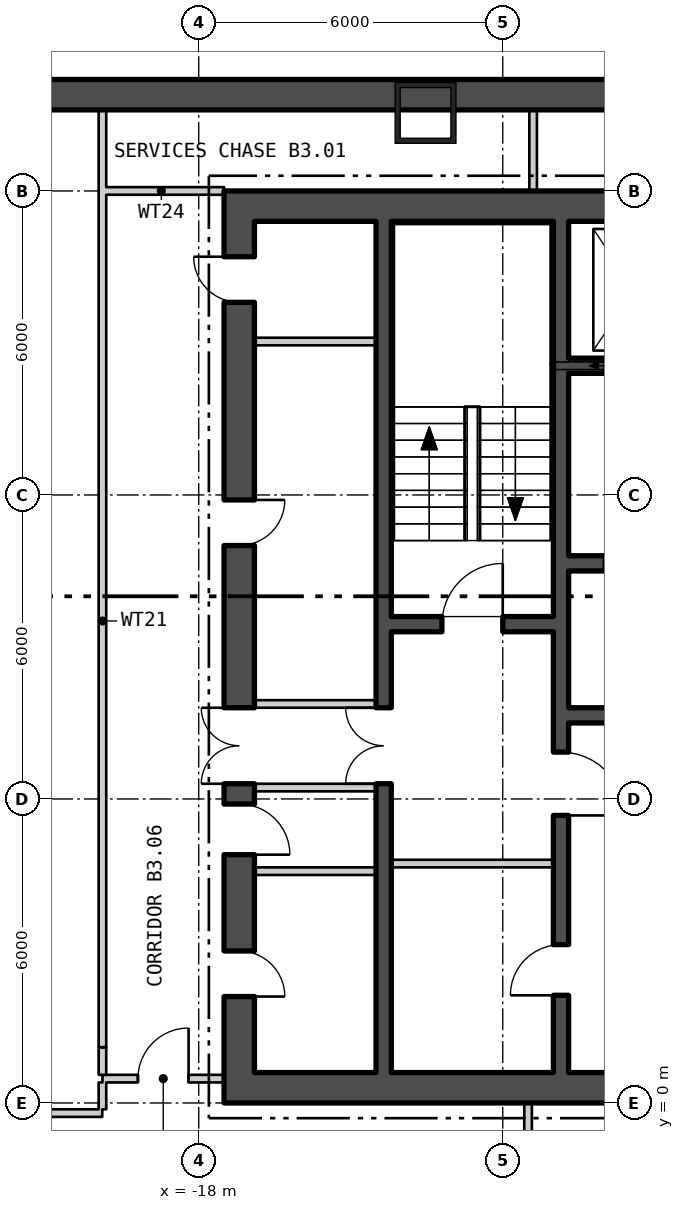
"""IFC4 building model, lengths in metres.
Left out: names, types, materials, properties, quantities, classifications, styles, units other than length and angle.
Written with IfcOpenShell. Run it as: python <this file> out.ifc"""

import sys

from ifc_helpers import new_model, si_unit, direction, frame, frame_2d, origin, origin_2d, place, context, subcontext, project, spatial, rectangle, hollow_rectangle, extrude, element, fill, save


model = new_model("IFC4")
c1 = context("Model", 3, precision=1e-05, world=origin(), true_north=direction((0.0, 1.0)))
c2 = subcontext(c1, "Body", "Model", "MODEL_VIEW")
j1 = project(units=[si_unit("LENGTHUNIT", "METRE"), si_unit("PLANEANGLEUNIT", "RADIAN")], contexts=[c1])
p1 = place(None, origin())
s1 = spatial("IfcSite", under=j1, at=p1, CompositionType="ELEMENT")
p2 = place(p1, origin())
s2 = spatial("IfcBuilding", under=s1, at=p2, CompositionType="ELEMENT")
p3 = place(p2, frame((0.0, 0.0, -16.8)))
s3 = spatial("IfcBuildingStorey", under=s2, at=p3, CompositionType="ELEMENT", Elevation=-16.8)
p4 = place(p3, frame((-13.523, 19.54, 0.0), z_axis=(0.0, 0.0, 1.0), x_axis=(-1.0, 0.0, 0.0)))
e1 = element("IfcColumn", 1, at=p4, inside=s3, PredefinedType="COLUMN", context=c2, shape_type="SweptSolid", body=[
    extrude(hollow_rectangle(XDim=1.2, YDim=1.2, WallThickness=0.1, at=origin_2d()), origin(), (0.0, 0.0, 1.0), 5.4),
])
p5 = place(p3, frame((-39.0, 19.9, -0.4), z_axis=(0.0, 0.0, 1.0), x_axis=(1.0, 0.0, 0.0)))
e2 = element("IfcWall", 2, at=p5, inside=s3, PredefinedType="STANDARD", context=c2, shape_type="SweptSolid", body=[
    extrude(rectangle(XDim=78.0, YDim=0.6, at=frame_2d((39.0, 0.0))), origin(), (0.0, 0.0, 1.0), 5.4),
])
p6 = place(p3, frame((-17.5, 0.3, 0.0), z_axis=(0.0, 0.0, 1.0), x_axis=(1.0, 0.0, 0.0)))
e3 = element("IfcWall", 3, at=p6, inside=s3, PredefinedType="SHEAR", context=c2, shape_type="SweptSolid", body=[
    extrude(rectangle(XDim=35.0, YDim=0.6, at=frame_2d((17.5, 0.0))), origin(), (0.0, 0.0, 1.0), 4.95),
])
p7 = place(p6, frame((12.0, 0.0, 0.0)))
e4 = element("IfcOpeningElement", 4, at=p7, cuts=e3, PredefinedType="OPENING", context=c2, shape_type="SweptSolid", body=[
    extrude(rectangle(XDim=1.8, YDim=2.4, at=frame_2d((0.9, 1.2))), frame((0.0, 0.31, 0.0), z_axis=(0.0, -1.0, 0.0), x_axis=(1.0, 0.0, 0.0)), (0.0, 0.0, 1.0), 0.62),
])
p8 = place(p6, frame((22.0, 0.0, 0.0)))
e5 = element("IfcOpeningElement", 5, at=p8, cuts=e3, PredefinedType="OPENING", context=c2, shape_type="SweptSolid", body=[
    extrude(rectangle(XDim=1.8, YDim=2.4, at=frame_2d((0.9, 1.2))), frame((0.0, 0.31, 0.0), z_axis=(0.0, -1.0, 0.0), x_axis=(1.0, 0.0, 0.0)), (0.0, 0.0, 1.0), 0.62),
])
p9 = place(p3, frame((-17.5, 17.7, 0.0), z_axis=(0.0, 0.0, 1.0), x_axis=(1.0, 0.0, 0.0)))
e6 = element("IfcWall", 6, at=p9, inside=s3, PredefinedType="SHEAR", context=c2, shape_type="SweptSolid", body=[
    extrude(rectangle(XDim=35.0, YDim=0.6, at=frame_2d((17.5, 0.0))), origin(), (0.0, 0.0, 1.0), 4.95),
])
p10 = place(p3, frame((-17.2, 0.6, 0.0), z_axis=(0.0, 0.0, 1.0), x_axis=(0.0, 1.0, 0.0)))
e7 = element("IfcWall", 7, at=p10, inside=s3, PredefinedType="SHEAR", context=c2, shape_type="SweptSolid", body=[
    extrude(rectangle(XDim=16.8, YDim=0.6, at=frame_2d((8.4, 0.0))), origin(), (0.0, 0.0, 1.0), 4.95),
])
p11 = place(p10, frame((5.7, 0.0, 0.0)))
e8 = element("IfcOpeningElement", 8, at=p11, cuts=e7, PredefinedType="OPENING", context=c2, shape_type="SweptSolid", body=[
    extrude(rectangle(XDim=1.5, YDim=2.1, at=frame_2d((0.75, 1.05))), frame((0.0, 0.31, 0.0), z_axis=(0.0, -1.0, 0.0), x_axis=(1.0, 0.0, 0.0)), (0.0, 0.0, 1.0), 0.62),
])
p12 = place(p10, frame((1.5, 0.0, 0.0)))
e9 = element("IfcOpeningElement", 9, at=p12, cuts=e7, PredefinedType="OPENING", context=c2, shape_type="SweptSolid", body=[
    extrude(rectangle(XDim=0.9, YDim=2.1, at=frame_2d((0.45, 1.05))), frame((0.0, 0.31, 0.0), z_axis=(0.0, -1.0, 0.0), x_axis=(1.0, 0.0, 0.0)), (0.0, 0.0, 1.0), 0.62),
])
p13 = place(p10, frame((4.3, 0.0, 0.0)))
e10 = element("IfcOpeningElement", 10, at=p13, cuts=e7, PredefinedType="OPENING", context=c2, shape_type="SweptSolid", body=[
    extrude(rectangle(XDim=1.0, YDim=2.1, at=frame_2d((0.5, 1.05))), frame((0.0, 0.31, 0.0), z_axis=(0.0, -1.0, 0.0), x_axis=(1.0, 0.0, 0.0)), (0.0, 0.0, 1.0), 0.62),
])
p14 = place(p10, frame((10.402, 0.0, 0.0)))
e11 = element("IfcOpeningElement", 11, at=p14, cuts=e7, PredefinedType="OPENING", context=c2, shape_type="SweptSolid", body=[
    extrude(rectangle(XDim=0.9, YDim=2.1, at=frame_2d((0.45, 1.05))), frame((0.0, 0.31, 0.0), z_axis=(0.0, -1.0, 0.0), x_axis=(1.0, 0.0, 0.0)), (0.0, 0.0, 1.0), 0.62),
])
p15 = place(p10, frame((15.202, 0.0, 0.0)))
e12 = element("IfcOpeningElement", 12, at=p15, cuts=e7, PredefinedType="OPENING", context=c2, shape_type="SweptSolid", body=[
    extrude(rectangle(XDim=0.9, YDim=2.1, at=frame_2d((0.45, 1.05))), frame((0.0, 0.31, 0.0), z_axis=(0.0, -1.0, 0.0), x_axis=(1.0, 0.0, 0.0)), (0.0, 0.0, 1.0), 0.62),
])
p16 = place(p3, frame((-10.85, 0.6, 0.0), z_axis=(0.0, 0.0, 1.0), x_axis=(0.0, 1.0, 0.0)))
e13 = element("IfcWall", 13, at=p16, inside=s3, PredefinedType="SHEAR", context=c2, shape_type="SweptSolid", body=[
    extrude(rectangle(XDim=16.8, YDim=0.3, at=frame_2d((8.4, 0.0))), origin(), (0.0, 0.0, 1.0), 4.95),
])
p17 = place(p16, frame((5.075, 0.0, 0.0)))
e14 = element("IfcOpeningElement", 14, at=p17, cuts=e13, PredefinedType="OPENING", context=c2, shape_type="SweptSolid", body=[
    extrude(rectangle(XDim=1.25, YDim=2.1, at=frame_2d((0.625, 1.05))), frame((0.0, 0.16, 0.0), z_axis=(0.0, -1.0, 0.0), x_axis=(1.0, 0.0, 0.0)), (0.0, 0.0, 1.0), 0.32),
])
p18 = place(p16, frame((1.525, 0.0, 0.0)))
e15 = element("IfcOpeningElement", 15, at=p18, cuts=e13, PredefinedType="OPENING", context=c2, shape_type="SweptSolid", body=[
    extrude(rectangle(XDim=1.0, YDim=2.1, at=frame_2d((0.5, 1.05))), frame((0.0, 0.16, 0.0), z_axis=(0.0, -1.0, 0.0), x_axis=(1.0, 0.0, 0.0)), (0.0, 0.0, 1.0), 0.32),
])
p19 = place(p3, frame((-14.35, 0.6, 0.0), z_axis=(0.0, 0.0, 1.0), x_axis=(0.0, 1.0, 0.0)))
e16 = element("IfcWall", 16, at=p19, inside=s3, PredefinedType="SHEAR", context=c2, shape_type="SweptSolid", body=[
    extrude(rectangle(XDim=16.8, YDim=0.3, at=frame_2d((8.4, 0.0))), origin(), (0.0, 0.0, 1.0), 4.95),
])
p20 = place(p19, frame((5.7, 0.0, 0.0)))
e17 = element("IfcOpeningElement", 17, at=p20, cuts=e16, PredefinedType="OPENING", context=c2, shape_type="SweptSolid", body=[
    extrude(rectangle(XDim=1.5, YDim=2.1, at=frame_2d((0.75, 1.05))), frame((0.0, 0.16, 0.0), z_axis=(0.0, -1.0, 0.0), x_axis=(1.0, 0.0, 0.0)), (0.0, 0.0, 1.0), 0.32),
])
p21 = place(p3, frame((-14.2, 9.45, 0.0), z_axis=(0.0, 0.0, 1.0), x_axis=(1.0, 0.0, 0.0)))
e18 = element("IfcWall", 18, at=p21, inside=s3, PredefinedType="SHEAR", context=c2, shape_type="SweptSolid", body=[
    extrude(rectangle(XDim=3.2, YDim=0.3, at=frame_2d((1.6, 0.0))), origin(), (0.0, 0.0, 1.0), 4.95),
])
p22 = place(p21, frame((1.0, 0.0, 0.0)))
e19 = element("IfcOpeningElement", 19, at=p22, cuts=e18, PredefinedType="OPENING", context=c2, shape_type="SweptSolid", body=[
    extrude(rectangle(XDim=1.2, YDim=2.1, at=frame_2d((0.6, 1.05))), frame((0.0, 0.16, 0.0), z_axis=(0.0, -1.0, 0.0), x_axis=(1.0, 0.0, 0.0)), (0.0, 0.0, 1.0), 0.32),
])
p23 = place(p3, frame((-10.7, 14.55, 0.0), z_axis=(0.0, 0.0, 1.0), x_axis=(1.0, 0.0, 0.0)))
e20 = element("IfcWall", 20, at=p23, inside=s3, PredefinedType="SHEAR", context=c2, shape_type="SweptSolid", body=[
    extrude(rectangle(XDim=21.4, YDim=0.3, at=frame_2d((10.7, 0.0))), origin(), (0.0, 0.0, 1.0), 4.95),
])
p24 = place(p23, frame((0.738, 0.0, 0.0)))
e21 = element("IfcOpeningElement", 21, at=p24, cuts=e20, PredefinedType="OPENING", context=c2, shape_type="SweptSolid", body=[
    extrude(rectangle(XDim=1.1, YDim=2.1, at=frame_2d((0.55, 1.05))), frame((0.0, 0.16, 0.0), z_axis=(0.0, -1.0, 0.0), x_axis=(1.0, 0.0, 0.0)), (0.0, 0.0, 1.0), 0.32),
])
p25 = place(p23, frame((19.562, 0.0, 0.0)))
e22 = element("IfcOpeningElement", 22, at=p25, cuts=e20, PredefinedType="OPENING", context=c2, shape_type="SweptSolid", body=[
    extrude(rectangle(XDim=1.1, YDim=2.1, at=frame_2d((0.55, 1.05))), frame((0.0, 0.16, 0.0), z_axis=(0.0, -1.0, 0.0), x_axis=(1.0, 0.0, 0.0)), (0.0, 0.0, 1.0), 0.32),
])
p26 = place(p23, frame((3.513, 0.0, 0.0)))
e23 = element("IfcOpeningElement", 23, at=p26, cuts=e20, PredefinedType="OPENING", context=c2, shape_type="SweptSolid", body=[
    extrude(rectangle(XDim=1.0, YDim=2.1, at=frame_2d((0.5, 1.05))), frame((0.0, 0.16, 0.0), z_axis=(0.0, -1.0, 0.0), x_axis=(1.0, 0.0, 0.0)), (0.0, 0.0, 1.0), 0.32),
])
p27 = place(p23, frame((6.188, 0.0, 0.0)))
e24 = element("IfcOpeningElement", 24, at=p27, cuts=e20, PredefinedType="OPENING", context=c2, shape_type="SweptSolid", body=[
    extrude(rectangle(XDim=1.0, YDim=2.1, at=frame_2d((0.5, 1.05))), frame((0.0, 0.16, 0.0), z_axis=(0.0, -1.0, 0.0), x_axis=(1.0, 0.0, 0.0)), (0.0, 0.0, 1.0), 0.32),
])
p28 = place(p23, frame((8.863, 0.0, 0.0)))
e25 = element("IfcOpeningElement", 25, at=p28, cuts=e20, PredefinedType="OPENING", context=c2, shape_type="SweptSolid", body=[
    extrude(rectangle(XDim=1.0, YDim=2.1, at=frame_2d((0.5, 1.05))), frame((0.0, 0.16, 0.0), z_axis=(0.0, -1.0, 0.0), x_axis=(1.0, 0.0, 0.0)), (0.0, 0.0, 1.0), 0.32),
])
p29 = place(p23, frame((11.537, 0.0, 0.0)))
e26 = element("IfcOpeningElement", 26, at=p29, cuts=e20, PredefinedType="OPENING", context=c2, shape_type="SweptSolid", body=[
    extrude(rectangle(XDim=1.0, YDim=2.1, at=frame_2d((0.5, 1.05))), frame((0.0, 0.16, 0.0), z_axis=(0.0, -1.0, 0.0), x_axis=(1.0, 0.0, 0.0)), (0.0, 0.0, 1.0), 0.32),
])
p30 = place(p23, frame((14.213, 0.0, 0.0)))
e27 = element("IfcOpeningElement", 27, at=p30, cuts=e20, PredefinedType="OPENING", context=c2, shape_type="SweptSolid", body=[
    extrude(rectangle(XDim=1.0, YDim=2.1, at=frame_2d((0.5, 1.05))), frame((0.0, 0.16, 0.0), z_axis=(0.0, -1.0, 0.0), x_axis=(1.0, 0.0, 0.0)), (0.0, 0.0, 1.0), 0.32),
])
p31 = place(p23, frame((16.887, 0.0, 0.0)))
e28 = element("IfcOpeningElement", 28, at=p31, cuts=e20, PredefinedType="OPENING", context=c2, shape_type="SweptSolid", body=[
    extrude(rectangle(XDim=1.0, YDim=2.1, at=frame_2d((0.5, 1.05))), frame((0.0, 0.16, 0.0), z_axis=(0.0, -1.0, 0.0), x_axis=(1.0, 0.0, 0.0)), (0.0, 0.0, 1.0), 0.32),
])
p32 = place(p3, frame((-10.7, 10.65, 0.0), z_axis=(0.0, 0.0, 1.0), x_axis=(1.0, 0.0, 0.0)))
e29 = element("IfcWall", 29, at=p32, inside=s3, PredefinedType="SHEAR", context=c2, shape_type="SweptSolid", body=[
    extrude(rectangle(XDim=10.3, YDim=0.3, at=frame_2d((5.15, 0.0))), origin(), (0.0, 0.0, 1.0), 4.95),
])
p33 = place(p32, frame((0.725, 0.0, 0.0)))
e30 = element("IfcOpeningElement", 30, at=p33, cuts=e29, PredefinedType="OPENING", context=c2, shape_type="SweptSolid", body=[
    extrude(rectangle(XDim=1.0, YDim=2.1, at=frame_2d((0.5, 1.05))), frame((0.0, 0.16, 0.0), z_axis=(0.0, -1.0, 0.0), x_axis=(1.0, 0.0, 0.0)), (0.0, 0.0, 1.0), 0.32),
])
p34 = place(p32, frame((3.325, 0.0, 0.0)))
e31 = element("IfcOpeningElement", 31, at=p34, cuts=e29, PredefinedType="OPENING", context=c2, shape_type="SweptSolid", body=[
    extrude(rectangle(XDim=1.0, YDim=2.1, at=frame_2d((0.5, 1.05))), frame((0.0, 0.16, 0.0), z_axis=(0.0, -1.0, 0.0), x_axis=(1.0, 0.0, 0.0)), (0.0, 0.0, 1.0), 0.32),
])
p35 = place(p32, frame((5.875, 0.0, 0.0)))
e32 = element("IfcOpeningElement", 32, at=p35, cuts=e29, PredefinedType="OPENING", context=c2, shape_type="SweptSolid", body=[
    extrude(rectangle(XDim=1.0, YDim=2.1, at=frame_2d((0.5, 1.05))), frame((0.0, 0.16, 0.0), z_axis=(0.0, -1.0, 0.0), x_axis=(1.0, 0.0, 0.0)), (0.0, 0.0, 1.0), 0.32),
])
p36 = place(p32, frame((8.425, 0.0, 0.0)))
e33 = element("IfcOpeningElement", 33, at=p36, cuts=e29, PredefinedType="OPENING", context=c2, shape_type="SweptSolid", body=[
    extrude(rectangle(XDim=1.0, YDim=2.1, at=frame_2d((0.5, 1.05))), frame((0.0, 0.16, 0.0), z_axis=(0.0, -1.0, 0.0), x_axis=(1.0, 0.0, 0.0)), (0.0, 0.0, 1.0), 0.32),
])
p37 = place(p3, frame((-10.7, 7.65, 0.0), z_axis=(0.0, 0.0, 1.0), x_axis=(1.0, 0.0, 0.0)))
e34 = element("IfcWall", 34, at=p37, inside=s3, PredefinedType="SHEAR", context=c2, shape_type="SweptSolid", body=[
    extrude(rectangle(XDim=10.3, YDim=0.3, at=frame_2d((5.15, 0.0))), origin(), (0.0, 0.0, 1.0), 4.95),
])
p38 = place(p3, frame((-14.2, 4.725, 0.0), z_axis=(0.0, 0.0, 1.0), x_axis=(1.0, 0.0, 0.0)))
e35 = element("IfcWall", 35, at=p38, inside=s3, PredefinedType="PARTITIONING", context=c2, shape_type="SweptSolid", body=[
    extrude(rectangle(XDim=3.2, YDim=0.15, at=frame_2d((1.6, 0.0))), origin(), (0.0, 0.0, 1.0), 4.95),
])
for number, where, z_axis, x_axis in (
    (36, (-16.9, 6.225, 0.0), (0.0, 0.0, 1.0), (1.0, 0.0, 0.0)),
    (37, (-16.9, 7.875, 0.0), (0.0, 0.0, 1.0), (1.0, 0.0, 0.0)),
    (38, (-16.9, 4.575, 0.0), (0.0, 0.0, 1.0), (1.0, 0.0, 0.0)),
    (39, (-16.9, 15.028, 0.0), (0.0, 0.0, 1.0), (1.0, 0.0, 0.0)),
):
    element("IfcWall", number, at=place(p3, frame(where, z_axis=z_axis, x_axis=x_axis)), inside=s3, PredefinedType="PARTITIONING", context=c2, shape_type="SweptSolid", body=[
        extrude(rectangle(XDim=2.4, YDim=0.15, at=frame_2d((1.2, 0.0))), origin(), (0.0, 0.0, 1.0), 4.95),
    ])
p39 = place(p3, frame((-26.75, -0.2, 0.0), z_axis=(0.0, 0.0, 1.0), x_axis=(1.0, 0.0, 0.0)))
e40 = element("IfcWall", 40, at=p39, inside=s3, PredefinedType="PARTITIONING", context=c2, shape_type="SweptSolid", body=[
    extrude(rectangle(XDim=6.846, YDim=0.15, at=frame_2d((3.423, 0.0))), origin(), (0.0, 0.0, 1.0), 4.95),
])
p40 = place(p39, frame((3.987, 0.0, 0.0)))
e41 = element("IfcOpeningElement", 41, at=p40, cuts=e40, PredefinedType="OPENING", context=c2, shape_type="SweptSolid", body=[
    extrude(rectangle(XDim=1.8, YDim=2.1, at=frame_2d((0.9, 1.05))), frame((0.0, 0.085, 0.0), z_axis=(0.0, -1.0, 0.0), x_axis=(1.0, 0.0, 0.0)), (0.0, 0.0, 1.0), 0.17),
])
p41 = place(p3, frame((-19.975, 18.0, 0.0), z_axis=(0.0, 0.0, 1.0), x_axis=(1.0, 0.0, 0.0)))
e42 = element("IfcWall", 42, at=p41, inside=s3, PredefinedType="PARTITIONING", context=c2, shape_type="SweptSolid", body=[
    extrude(rectangle(XDim=2.475, YDim=0.15, at=frame_2d((1.238, 0.0))), origin(), (0.0, 0.0, 1.0), 4.95),
])
p42 = place(p3, frame((-19.9, -0.125, 0.0), z_axis=(0.0, 0.0, 1.0), x_axis=(0.0, 1.0, 0.0)))
e43 = element("IfcWall", 43, at=p42, inside=s3, PredefinedType="PARTITIONING", context=c2, shape_type="SweptSolid", body=[
    extrude(rectangle(XDim=0.53, YDim=0.15, at=frame_2d((0.265, 0.0))), origin(), (0.0, 0.0, 1.0), 4.95),
])
p43 = place(p3, frame((-19.9, 0.48, 0.0), z_axis=(0.0, 0.0, 1.0), x_axis=(1.0, 0.0, 0.0)))
e44 = element("IfcWall", 44, at=p43, inside=s3, PredefinedType="PARTITIONING", context=c2, shape_type="SweptSolid", body=[
    extrude(rectangle(XDim=2.4, YDim=0.15, at=frame_2d((1.2, 0.0))), origin(), (0.0, 0.0, 1.0), 4.95),
])
p44 = place(p43, frame((0.7, 0.0, 0.0)))
e45 = element("IfcOpeningElement", 45, at=p44, cuts=e44, PredefinedType="OPENING", context=c2, shape_type="SweptSolid", body=[
    extrude(rectangle(XDim=1.0, YDim=2.1, at=frame_2d((0.5, 1.05))), frame((0.0, 0.085, 0.0), z_axis=(0.0, -1.0, 0.0), x_axis=(1.0, 0.0, 0.0)), (0.0, 0.0, 1.0), 0.17),
])
p45 = place(p3, frame((-19.9, 0.555, 0.0), z_axis=(0.0, 0.0, 1.0), x_axis=(0.0, 1.0, 0.0)))
e46 = element("IfcWall", 46, at=p45, inside=s3, PredefinedType="PARTITIONING", context=c2, shape_type="SweptSolid", body=[
    extrude(rectangle(XDim=0.541, YDim=0.15, at=frame_2d((0.271, 0.0))), origin(), (0.0, 0.0, 1.0), 4.95),
])
p46 = place(p3, frame((-19.9, 1.101, 0.0), z_axis=(0.0, 0.0, 1.0), x_axis=(0.0, 1.0, 0.0)))
e47 = element("IfcWall", 47, at=p46, inside=s3, PredefinedType="PARTITIONING", context=c2, shape_type="SweptSolid", body=[
    extrude(rectangle(XDim=16.824, YDim=0.15, at=frame_2d((8.412, 0.0))), origin(), (0.0, 0.0, 1.0), 4.95),
])
p47 = place(p3, frame((-19.9, 18.075, 0.0), z_axis=(0.0, 0.0, 1.0), x_axis=(0.0, 1.0, 0.0)))
e48 = element("IfcWall", 48, at=p47, inside=s3, PredefinedType="PARTITIONING", context=c2, shape_type="SweptSolid", body=[
    extrude(rectangle(XDim=1.675, YDim=0.15, at=frame_2d((0.838, 0.0))), origin(), (0.0, 0.0, 1.0), 4.95),
])
p48 = place(p3, frame((-11.5, -6.075, 0.0), z_axis=(0.0, 0.0, 1.0), x_axis=(0.0, 1.0, 0.0)))
e49 = element("IfcWall", 49, at=p48, inside=s3, PredefinedType="PARTITIONING", context=c2, shape_type="SweptSolid", body=[
    extrude(rectangle(XDim=6.075, YDim=0.15, at=frame_2d((3.038, 0.0))), origin(), (0.0, 0.0, 1.0), 4.95),
])
p49 = place(p48, frame((4.375, 0.0, 0.0)))
e50 = element("IfcOpeningElement", 50, at=p49, cuts=e49, PredefinedType="OPENING", context=c2, shape_type="SweptSolid", body=[
    extrude(rectangle(XDim=1.0, YDim=2.1, at=frame_2d((0.5, 1.05))), frame((0.0, 0.085, 0.0), z_axis=(0.0, -1.0, 0.0), x_axis=(1.0, 0.0, 0.0)), (0.0, 0.0, 1.0), 0.17),
])
p50 = place(p3, frame((-11.4, 18.0, 0.0), z_axis=(0.0, 0.0, 1.0), x_axis=(0.0, 1.0, 0.0)))
e51 = element("IfcWall", 51, at=p50, inside=s3, PredefinedType="PARTITIONING", context=c2, shape_type="SweptSolid", body=[
    extrude(rectangle(XDim=1.75, YDim=0.15, at=frame_2d((0.875, 0.0))), origin(), (0.0, 0.0, 1.0), 4.95),
])
p51 = place(p22, origin())
e52 = element("IfcDoor", 52, at=p51, inside=s3, OperationType="SINGLE_SWING_LEFT", PredefinedType="DOOR", context=c2, shape_type="SweptSolid", body=[
    extrude(rectangle(XDim=1.2, YDim=2.1, at=frame_2d((0.6, 1.05))), frame((0.0, 0.025, 0.0), z_axis=(0.0, -1.0, 0.0), x_axis=(1.0, 0.0, 0.0)), (0.0, 0.0, 1.0), 0.05),
])
fill(e19, e52)
p52 = place(p17, origin())
e53 = element("IfcDoor", 53, at=p52, inside=s3, OperationType="SINGLE_SWING_LEFT", PredefinedType="DOOR", context=c2, shape_type="SweptSolid", body=[
    extrude(rectangle(XDim=1.25, YDim=2.1, at=frame_2d((0.625, 1.05))), frame((0.0, 0.025, 0.0), z_axis=(0.0, -1.0, 0.0), x_axis=(1.0, 0.0, 0.0)), (0.0, 0.0, 1.0), 0.05),
])
fill(e14, e53)
p53 = place(p18, origin())
e54 = element("IfcDoor", 54, at=p53, inside=s3, OperationType="SINGLE_SWING_RIGHT", PredefinedType="DOOR", context=c2, shape_type="SweptSolid", body=[
    extrude(rectangle(XDim=1.0, YDim=2.1, at=frame_2d((0.5, 1.05))), frame((0.0, 0.025, 0.0), z_axis=(0.0, -1.0, 0.0), x_axis=(1.0, 0.0, 0.0)), (0.0, 0.0, 1.0), 0.05),
])
fill(e15, e54)
p54 = place(p20, origin())
e55 = element("IfcDoor", 55, at=p54, inside=s3, OperationType="DOUBLE_DOOR_SINGLE_SWING", PredefinedType="DOOR", context=c2, shape_type="SweptSolid", body=[
    extrude(rectangle(XDim=1.5, YDim=2.1, at=frame_2d((0.75, 1.05))), frame((0.0, 0.025, 0.0), z_axis=(0.0, -1.0, 0.0), x_axis=(1.0, 0.0, 0.0)), (0.0, 0.0, 1.0), 0.05),
])
fill(e17, e55)
p55 = place(p11, origin())
e56 = element("IfcDoor", 56, at=p55, inside=s3, OperationType="DOUBLE_DOOR_SINGLE_SWING", PredefinedType="DOOR", context=c2, shape_type="SweptSolid", body=[
    extrude(rectangle(XDim=1.5, YDim=2.1, at=frame_2d((0.75, 1.05))), frame((0.0, 0.025, 0.0), z_axis=(0.0, -1.0, 0.0), x_axis=(1.0, 0.0, 0.0)), (0.0, 0.0, 1.0), 0.05),
])
fill(e8, e56)
p56 = place(p12, origin())
e57 = element("IfcDoor", 57, at=p56, inside=s3, OperationType="SINGLE_SWING_LEFT", PredefinedType="DOOR", context=c2, shape_type="SweptSolid", body=[
    extrude(rectangle(XDim=0.9, YDim=2.1, at=frame_2d((0.45, 1.05))), frame((0.0, 0.025, 0.0), z_axis=(0.0, -1.0, 0.0), x_axis=(1.0, 0.0, 0.0)), (0.0, 0.0, 1.0), 0.05),
])
fill(e9, e57)
p57 = place(p13, origin())
e58 = element("IfcDoor", 58, at=p57, inside=s3, OperationType="SINGLE_SWING_LEFT", PredefinedType="DOOR", context=c2, shape_type="SweptSolid", body=[
    extrude(rectangle(XDim=1.0, YDim=2.1, at=frame_2d((0.5, 1.05))), frame((0.0, 0.025, 0.0), z_axis=(0.0, -1.0, 0.0), x_axis=(1.0, 0.0, 0.0)), (0.0, 0.0, 1.0), 0.05),
])
fill(e10, e58)
p58 = place(p14, origin())
e59 = element("IfcDoor", 59, at=p58, inside=s3, OperationType="SINGLE_SWING_RIGHT", PredefinedType="DOOR", context=c2, shape_type="SweptSolid", body=[
    extrude(rectangle(XDim=0.9, YDim=2.1, at=frame_2d((0.45, 1.05))), frame((0.0, 0.025, 0.0), z_axis=(0.0, -1.0, 0.0), x_axis=(1.0, 0.0, 0.0)), (0.0, 0.0, 1.0), 0.05),
])
fill(e11, e59)
p59 = place(p15, origin())
e60 = element("IfcDoor", 60, at=p59, inside=s3, OperationType="SINGLE_SWING_LEFT", PredefinedType="DOOR", context=c2, shape_type="SweptSolid", body=[
    extrude(rectangle(XDim=0.9, YDim=2.1, at=frame_2d((0.45, 1.05))), frame((0.0, 0.025, 0.0), z_axis=(0.0, -1.0, 0.0), x_axis=(1.0, 0.0, 0.0)), (0.0, 0.0, 1.0), 0.05),
])
fill(e12, e60)
p60 = place(p44, origin())
e61 = element("IfcDoor", 61, at=p60, inside=s3, OperationType="SINGLE_SWING_LEFT", PredefinedType="DOOR", context=c2, shape_type="SweptSolid", body=[
    extrude(rectangle(XDim=1.0, YDim=2.1, at=frame_2d((0.5, 1.05))), frame((0.0, 0.025, 0.0), z_axis=(0.0, -1.0, 0.0), x_axis=(1.0, 0.0, 0.0)), (0.0, 0.0, 1.0), 0.05),
])
fill(e45, e61)
save(model, sys.argv[1])
